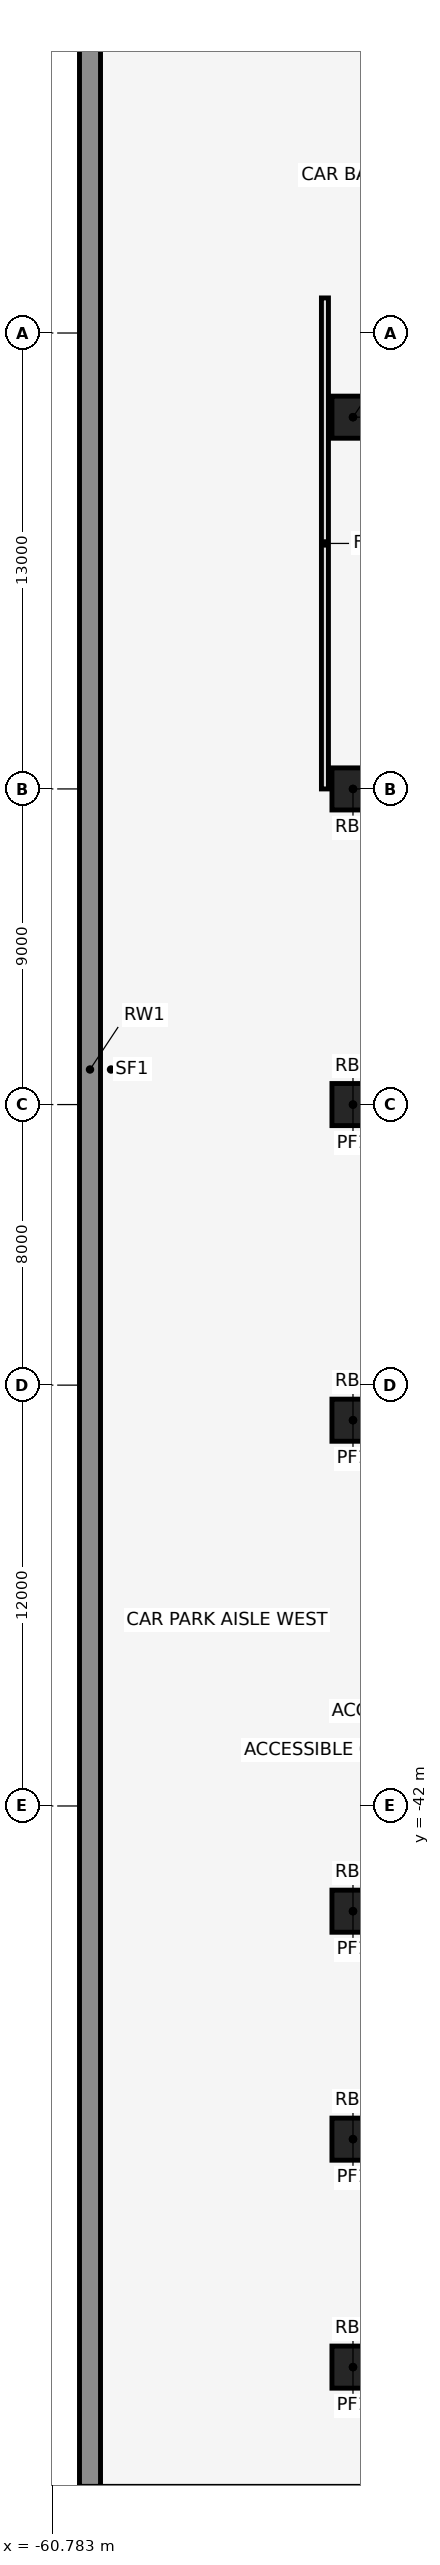
"""IFC4 building model, lengths in metres.
Left out: names, types, materials, properties, quantities, classifications, styles, units other than length and angle.
Written with IfcOpenShell. Run it as: python <this file> out.ifc"""

import sys

from ifc_helpers import new_model, si_unit, direction, frame, frame_2d, origin, origin_2d, place, context, subcontext, project, spatial, rectangle, extrude, element, save


model = new_model("IFC4")
c1 = context("Model", 3, precision=1e-05, world=origin(), true_north=direction((0.0, 1.0)))
c2 = subcontext(c1, "Body", "Model", "MODEL_VIEW")
j1 = project(units=[si_unit("LENGTHUNIT", "METRE"), si_unit("PLANEANGLEUNIT", "RADIAN")], contexts=[c1])
p1 = place(None, origin())
s1 = spatial("IfcSite", under=j1, at=p1, CompositionType="ELEMENT")
p2 = place(p1, origin())
s2 = spatial("IfcBuilding", under=s1, at=p2, CompositionType="ELEMENT")
p3 = place(p2, frame((0.0, 0.0, -15.0)))
s3 = spatial("IfcBuildingStorey", under=s2, at=p3, CompositionType="ELEMENT", Elevation=-15.0)
for number, where, z_axis, x_axis in (
    (1, (-52.2, -2.4, -0.3), (0.0, 0.0, 1.0), (1.0, 0.0, 0.0)),
    (2, (-52.2, -13.0, -0.3), (0.0, 0.0, 1.0), (1.0, 0.0, 0.0)),
    (3, (-52.2, -22.0, -0.3), (0.0, 0.0, 1.0), (1.0, 0.0, 0.0)),
    (4, (-52.2, -31.0, -0.3), (0.0, 0.0, 1.0), (1.0, 0.0, 0.0)),
    (5, (-52.2, -45.0, -0.3), (0.0, 0.0, 1.0), (1.0, 0.0, 0.0)),
    (6, (-52.2, -51.5, -0.3), (0.0, 0.0, 1.0), (1.0, 0.0, 0.0)),
    (7, (-52.2, -58.0, -0.3), (0.0, 0.0, 1.0), (1.0, 0.0, 0.0)),
):
    element("IfcColumn", number, at=place(p3, frame(where, z_axis=z_axis, x_axis=x_axis)), inside=s3, PredefinedType="COLUMN", context=c2, shape_type="SweptSolid", body=[
        extrude(rectangle(XDim=1.2, YDim=1.2, at=origin_2d()), origin(), (0.0, 0.0, 1.0), 5.3),
    ])
p4 = place(p3, frame((-59.7, -61.4, -0.3), z_axis=(0.0, 0.0, 1.0), x_axis=(0.0, 1.0, 0.0)))
e8 = element("IfcWall", 8, at=p4, inside=s3, PredefinedType="SOLIDWALL", context=c2, shape_type="SweptSolid", body=[
    extrude(rectangle(XDim=80.8, YDim=0.6, at=frame_2d((40.4, 0.0))), origin(), (0.0, 0.0, 1.0), 5.3),
])
p5 = place(p3, frame((-53.0, -13.0, 0.0), z_axis=(0.0, 0.0, 1.0), x_axis=(0.0, 1.0, 0.0)))
e9 = element("IfcWall", 9, at=p5, inside=s3, PredefinedType="PARTITIONING", context=c2, shape_type="SweptSolid", body=[
    extrude(rectangle(XDim=14.0, YDim=0.2, at=frame_2d((7.0, 0.0))), origin(), (0.0, 0.0, 1.0), 4.7),
])
save(model, sys.argv[1])
